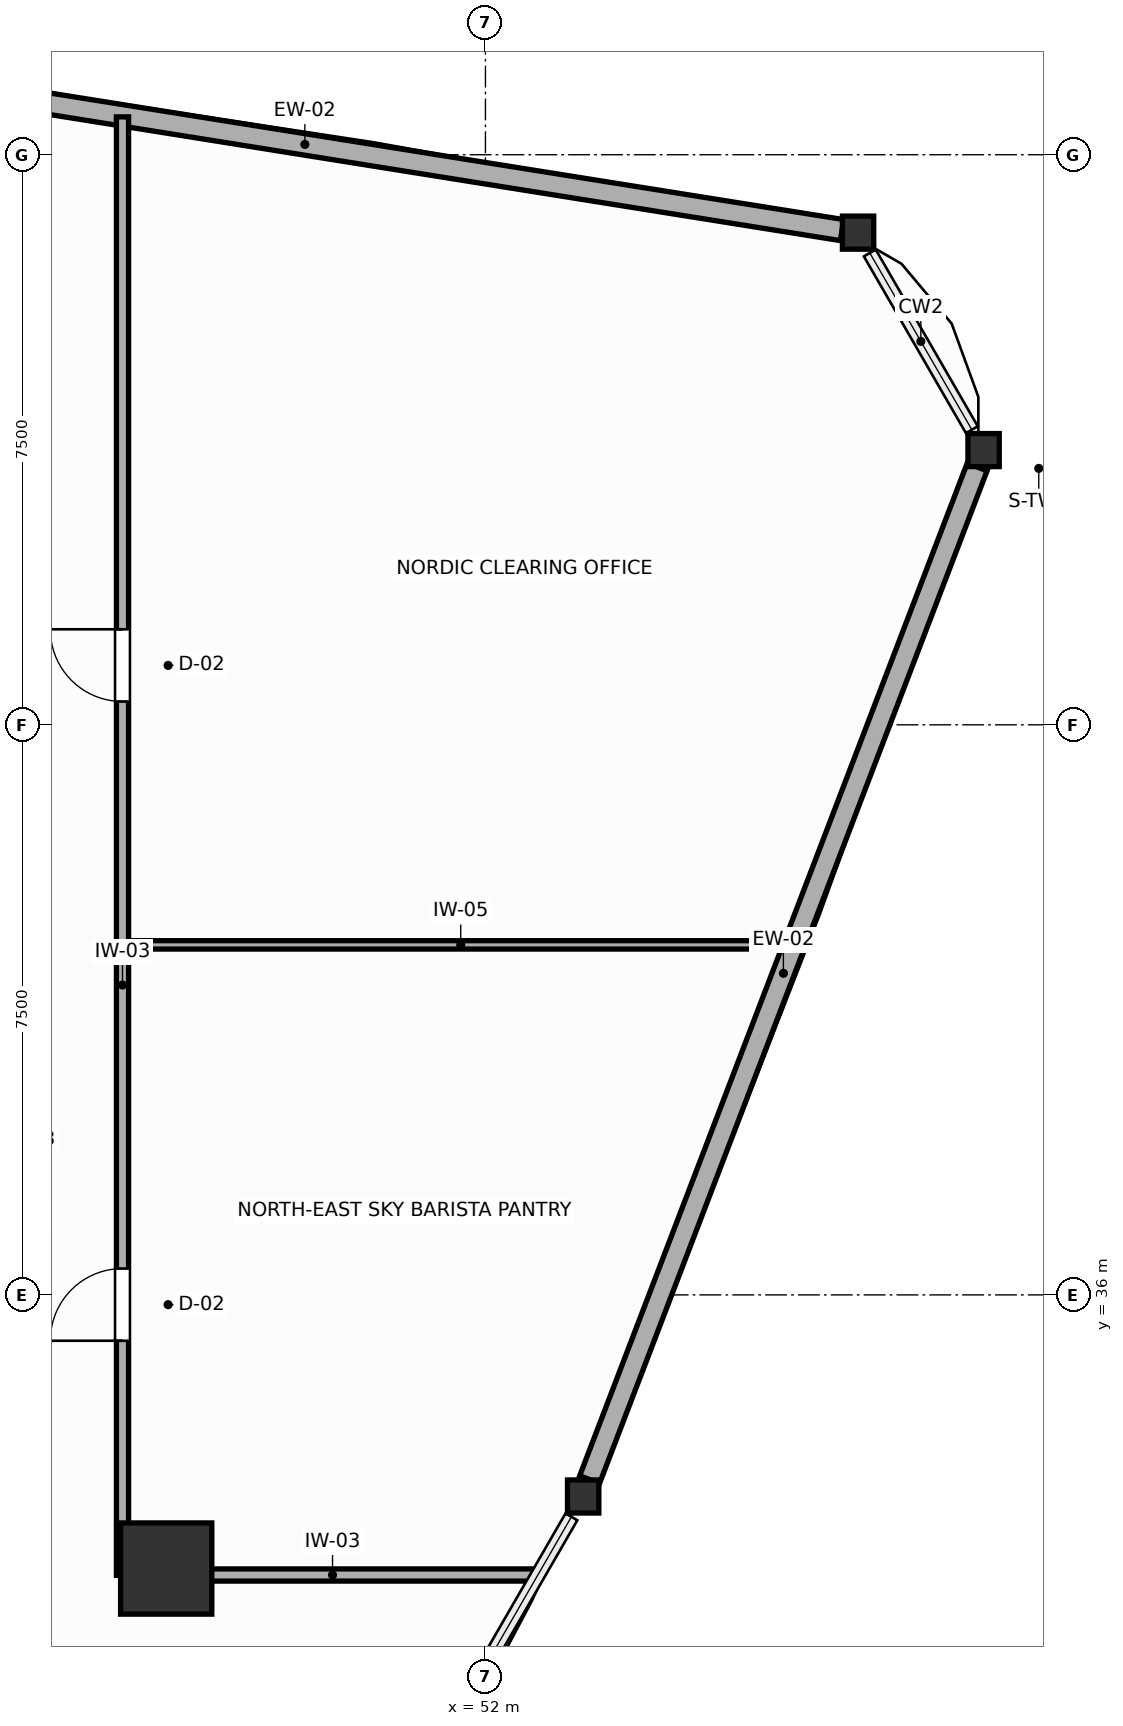
"""IFC4 building model, lengths in metres.
Left out: names, types, materials, properties, quantities, classifications, styles, units other than length and angle.
Written with IfcOpenShell. Run it as: python <this file> out.ifc"""

import sys

from ifc_helpers import new_model, si_unit, direction, frame, frame_2d, origin, origin_2d, place, context, subcontext, project, spatial, rectangle, i_section, extrude, source, transform, mapped, element, fill, save


model = new_model("IFC4")
c1 = context("Model", 3, precision=1e-05, world=origin(), true_north=direction((0.0, 1.0)))
c2 = subcontext(c1, "Body", "Model", "MODEL_VIEW")
j1 = project(units=[si_unit("LENGTHUNIT", "METRE"), si_unit("PLANEANGLEUNIT", "RADIAN")], contexts=[c1])
p1 = place(None, origin())
s1 = spatial("IfcSite", under=j1, at=p1, CompositionType="ELEMENT")
p2 = place(p1, origin())
s2 = spatial("IfcBuilding", under=s1, at=p2, CompositionType="ELEMENT")
p3 = place(p2, frame((0.0, 0.0, 168.6)))
s3 = spatial("IfcBuildingStorey", under=s2, at=p3, CompositionType="ELEMENT", Elevation=168.6)
m1 = source(origin(), c2, "Body", "SweptSolid", [
    extrude(rectangle(XDim=1.2, YDim=1.2, at=origin_2d()), origin(), (0.0, 0.0, 1.0), 3.6),
])
p4 = place(p3, frame((47.8, 32.4, 0.0), z_axis=(0.0, 0.0, 1.0), x_axis=(1.0, 0.0, 0.0)))
e1 = element("IfcColumn", 1, at=p4, inside=s3, PredefinedType="COLUMN", context=c2, shape_type="MappedRepresentation", body=[
    mapped(m1, transform((0.0, 0.0, 0.0), scale=1.0)),
])
m2 = source(origin(), c2, "Body", "SweptSolid", [
    extrude(i_section(OverallWidth=0.412, OverallDepth=0.435, WebThickness=0.033, FlangeThickness=0.053, FilletRadius=0.015, at=origin_2d()), origin(), (0.0, 0.0, 1.0), 3.6),
])
for number, where, z_axis, x_axis in (
    (2, (58.554, 47.115, 0.0), (0.0, 0.0, 1.0), (1.0, 0.0, 0.0)),
    (3, (56.902, 49.975, 0.0), (0.0, 0.0, 1.0), (1.0, 0.0, 0.0)),
    (4, (53.286, 33.348, 0.0), (0.0, 0.0, 1.0), (1.0, 0.0, 0.0)),
):
    element("IfcColumn", number, at=place(p3, frame(where, z_axis=z_axis, x_axis=x_axis)), inside=s3, PredefinedType="COLUMN", context=c2, shape_type="MappedRepresentation", body=[
        mapped(m2, transform((0.0, 0.0, 0.0), scale=1.0)),
    ])
p5 = place(p3, frame((56.691, 50.009, 0.0), z_axis=(0.0, 0.0, 1.0), x_axis=(-0.987526171813, 0.157454945885, 0.0)))
e5 = element("IfcWall", 5, at=p5, inside=s3, PredefinedType="SOLIDWALL", context=c2, shape_type="SweptSolid", body=[
    extrude(rectangle(XDim=14.313, YDim=0.28, at=frame_2d((7.156, 0.0))), origin(), (0.0, 0.0, 1.0), 3.0),
])
p6 = place(p3, frame((53.371, 33.57, 0.0), z_axis=(0.0, 0.0, 1.0), x_axis=(0.357419860287, 0.933943811732, 0.0)))
e6 = element("IfcWall", 6, at=p6, inside=s3, PredefinedType="SOLIDWALL", context=c2, shape_type="SweptSolid", body=[
    extrude(rectangle(XDim=14.264, YDim=0.28, at=frame_2d((7.132, 0.0))), origin(), (0.0, 0.0, 1.0), 3.0),
])
p7 = place(p3, frame((47.225, 32.31, 0.0), z_axis=(0.0, 0.0, 1.0), x_axis=(0.0, 1.0, 0.0)))
e7 = element("IfcWall", 7, at=p7, inside=s3, PredefinedType="PARTITIONING", context=c2, shape_type="SweptSolid", body=[
    extrude(rectangle(XDim=19.188, YDim=0.16, at=frame_2d((9.594, 0.0))), origin(), (0.0, 0.0, 1.0), 3.4),
])
p8 = place(p7, frame((3.087, 0.0, 0.0)))
e8 = element("IfcOpeningElement", 8, at=p8, cuts=e7, PredefinedType="OPENING", context=c2, shape_type="SweptSolid", body=[
    extrude(rectangle(XDim=0.95, YDim=2.05, at=frame_2d((0.475, 1.025))), frame((0.0, 0.09, 0.0), z_axis=(0.0, -1.0, 0.0), x_axis=(1.0, 0.0, 0.0)), (0.0, 0.0, 1.0), 0.18),
])
p9 = place(p7, frame((11.497, 0.0, 0.0)))
e9 = element("IfcOpeningElement", 9, at=p9, cuts=e7, PredefinedType="OPENING", context=c2, shape_type="SweptSolid", body=[
    extrude(rectangle(XDim=0.95, YDim=2.05, at=frame_2d((0.475, 1.025))), frame((0.0, 0.09, 0.0), z_axis=(0.0, -1.0, 0.0), x_axis=(1.0, 0.0, 0.0)), (0.0, 0.0, 1.0), 0.18),
])
p10 = place(p3, frame((47.307, 32.315, 0.0), z_axis=(0.0, 0.0, 1.0), x_axis=(1.0, 0.0, 0.0)))
e10 = element("IfcWall", 10, at=p10, inside=s3, PredefinedType="PARTITIONING", context=c2, shape_type="SweptSolid", body=[
    extrude(rectangle(XDim=5.362, YDim=0.16, at=frame_2d((2.681, 0.0))), origin(), (0.0, 0.0, 1.0), 2.95),
])
p11 = place(p3, frame((47.307, 40.605, 0.0), z_axis=(0.0, 0.0, 1.0), x_axis=(1.0, 0.0, 0.0)))
e11 = element("IfcWall", 11, at=p11, inside=s3, PredefinedType="MOVABLE", context=c2, shape_type="SweptSolid", body=[
    extrude(rectangle(XDim=8.736, YDim=0.11, at=frame_2d((4.368, 0.0))), origin(), (0.0, 0.0, 1.0), 3.4),
])
p12 = place(p8, origin())
e12 = element("IfcDoor", 12, at=p12, inside=s3, OperationType="SINGLE_SWING_LEFT", PredefinedType="DOOR", context=c2, shape_type="SweptSolid", body=[
    extrude(rectangle(XDim=0.95, YDim=2.05, at=frame_2d((0.475, 1.025))), frame((0.0, 0.025, 0.0), z_axis=(0.0, -1.0, 0.0), x_axis=(1.0, 0.0, 0.0)), (0.0, 0.0, 1.0), 0.05),
])
fill(e8, e12)
p13 = place(p9, origin())
e13 = element("IfcDoor", 13, at=p13, inside=s3, OperationType="SINGLE_SWING_RIGHT", PredefinedType="DOOR", context=c2, shape_type="SweptSolid", body=[
    extrude(rectangle(XDim=0.95, YDim=2.05, at=frame_2d((0.475, 1.025))), frame((0.0, 0.025, 0.0), z_axis=(0.0, -1.0, 0.0), x_axis=(1.0, 0.0, 0.0)), (0.0, 0.0, 1.0), 0.05),
])
fill(e9, e13)
save(model, sys.argv[1])
